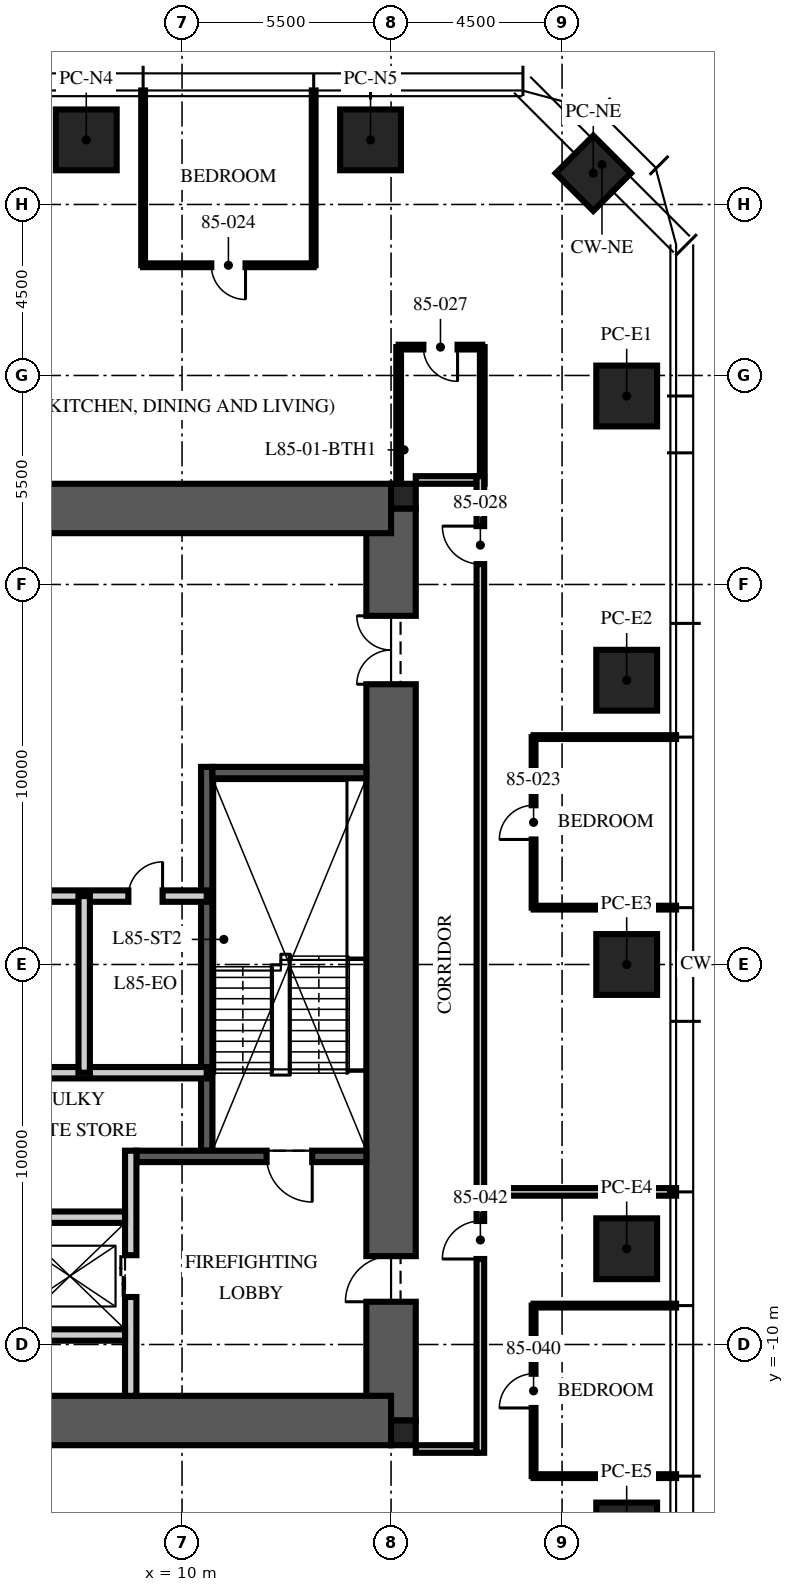
"""IFC4 building model, lengths in metres.
Left out: names, types, materials, properties, quantities, classifications, styles, units other than length and angle.
Written with IfcOpenShell. Run it as: python <this file> out.ifc"""

import sys

from ifc_helpers import new_model, si_unit, direction, frame, frame_2d, origin, origin_2d, place, context, subcontext, project, spatial, rectangle, extrude, element, fill, save


model = new_model("IFC4")
c1 = context("Model", 3, precision=1e-05, world=origin(), true_north=direction((0.0, 1.0)))
c2 = subcontext(c1, "Body", "Model", "MODEL_VIEW")
j1 = project(units=[si_unit("LENGTHUNIT", "METRE"), si_unit("PLANEANGLEUNIT", "RADIAN")], contexts=[c1])
p1 = place(None, origin())
s1 = spatial("IfcSite", under=j1, at=p1, CompositionType="ELEMENT")
p2 = place(p1, origin())
s2 = spatial("IfcBuilding", under=s1, at=p2, CompositionType="ELEMENT")
p3 = place(p2, frame((0.0, 0.0, 338.25)))
s3 = spatial("IfcBuildingStorey", under=s2, at=p3, CompositionType="ELEMENT", Elevation=338.25)
p4 = place(p3, frame((15.5, -12.0, -0.25), z_axis=(0.0, 0.0, 1.0), x_axis=(0.0, 1.0, 0.0)))
e1 = element("IfcWall", 1, at=p4, inside=s3, PredefinedType="SHEAR", context=c2, shape_type="SweptSolid", body=[
    extrude(rectangle(XDim=24.0, YDim=1.3, at=frame_2d((12.0, 0.0))), origin(), (0.0, 0.0, 1.0), 3.75),
])
p5 = place(p4, frame((3.125, 0.0, 0.25)))
e2 = element("IfcOpeningElement", 2, at=p5, cuts=e1, PredefinedType="OPENING", context=c2, shape_type="SweptSolid", body=[
    extrude(rectangle(XDim=1.2, YDim=2.1, at=frame_2d((0.6, 1.05))), frame((0.0, 0.66, 0.0), z_axis=(0.0, -1.0, 0.0), x_axis=(1.0, 0.0, 0.0)), (0.0, 0.0, 1.0), 1.32),
])
p6 = place(p4, frame((19.375, 0.0, 0.25)))
e3 = element("IfcOpeningElement", 3, at=p6, cuts=e1, PredefinedType="OPENING", context=c2, shape_type="SweptSolid", body=[
    extrude(rectangle(XDim=1.8, YDim=2.1, at=frame_2d((0.9, 1.05))), frame((0.0, 0.66, 0.0), z_axis=(0.0, -1.0, 0.0), x_axis=(1.0, 0.0, 0.0)), (0.0, 0.0, 1.0), 1.32),
])
for number, where, z_axis, x_axis in (
    (4, (-15.5, 12.0, -0.25), (0.0, 0.0, 1.0), (1.0, 0.0, 0.0)),
    (5, (-15.5, -12.0, -0.25), (0.0, 0.0, 1.0), (1.0, 0.0, 0.0)),
):
    element("IfcWall", number, at=place(p3, frame(where, z_axis=z_axis, x_axis=x_axis)), inside=s3, PredefinedType="SHEAR", context=c2, shape_type="SweptSolid", body=[
        extrude(rectangle(XDim=31.0, YDim=1.3, at=frame_2d((15.5, 0.0))), origin(), (0.0, 0.0, 1.0), 3.75),
    ])
for number, where, z_axis, x_axis in (
    (6, (15.825, 12.325, -0.25), (0.0, 0.0, 1.0), (1.0, 0.0, 0.0)),
    (7, (15.825, -12.325, -0.25), (0.0, 0.0, 1.0), (1.0, 0.0, 0.0)),
):
    element("IfcColumn", number, at=place(p3, frame(where, z_axis=z_axis, x_axis=x_axis)), inside=s3, PredefinedType="COLUMN", context=c2, shape_type="SweptSolid", body=[
        extrude(rectangle(XDim=0.65, YDim=0.65, at=origin_2d()), origin(), (0.0, 0.0, 1.0), 3.75),
    ])
for number, where, z_axis, x_axis in (
    (8, (7.48, 21.7, 0.0), (0.0, 0.0, 1.0), (1.0, 0.0, 0.0)),
    (9, (14.96, 21.7, 0.0), (0.0, 0.0, 1.0), (1.0, 0.0, 0.0)),
    (10, (21.7, 14.96, 0.0), (0.0, 0.0, 1.0), (0.0, 1.0, 0.0)),
    (11, (21.7, 7.48, 0.0), (0.0, 0.0, 1.0), (0.0, 1.0, 0.0)),
    (12, (21.7, 0.0, 0.0), (0.0, 0.0, 1.0), (0.0, 1.0, 0.0)),
    (13, (21.7, -7.48, 0.0), (0.0, 0.0, 1.0), (0.0, 1.0, 0.0)),
    (14, (21.7, -14.96, 0.0), (0.0, 0.0, 1.0), (0.0, 1.0, 0.0)),
):
    element("IfcColumn", number, at=place(p3, frame(where, z_axis=z_axis, x_axis=x_axis)), inside=s3, PredefinedType="COLUMN", context=c2, shape_type="SweptSolid", body=[
        extrude(rectangle(XDim=1.6, YDim=1.6, at=origin_2d()), origin(), (0.0, 0.0, 1.0), 3.75),
    ])
p7 = place(p3, frame((20.821, 20.821, 0.0), z_axis=(0.0, 0.0, 1.0), x_axis=(0.707106781187, -0.707106781187, 0.0)))
e15 = element("IfcColumn", 15, at=p7, inside=s3, PredefinedType="COLUMN", context=c2, shape_type="SweptSolid", body=[
    extrude(rectangle(XDim=1.4, YDim=1.4, at=origin_2d()), origin(), (0.0, 0.0, 1.0), 3.75),
])
p8 = place(p3, frame((10.65, -4.9, 0.0), z_axis=(0.0, 0.0, 1.0), x_axis=(0.0, 1.0, 0.0)))
e16 = element("IfcWall", 16, at=p8, inside=s3, PredefinedType="SOLIDWALL", context=c2, shape_type="SweptSolid", body=[
    extrude(rectangle(XDim=10.1, YDim=0.3, at=frame_2d((5.05, 0.0))), origin(), (0.0, 0.0, 1.0), 3.5),
])
p9 = place(p3, frame((14.85, -5.05, 0.0), z_axis=(0.0, 0.0, 1.0), x_axis=(-1.0, 0.0, 0.0)))
e17 = element("IfcWall", 17, at=p9, inside=s3, PredefinedType="SOLIDWALL", context=c2, shape_type="SweptSolid", body=[
    extrude(rectangle(XDim=6.05, YDim=0.3, at=frame_2d((3.025, 0.0))), origin(), (0.0, 0.0, 1.0), 3.5),
])
p10 = place(p9, frame((1.425, 0.0, 0.0)))
e18 = element("IfcOpeningElement", 18, at=p10, cuts=e17, PredefinedType="OPENING", context=c2, shape_type="SweptSolid", body=[
    extrude(rectangle(XDim=1.2, YDim=2.1, at=frame_2d((0.6, 1.05))), frame((0.0, 0.16, 0.0), z_axis=(0.0, -1.0, 0.0), x_axis=(1.0, 0.0, 0.0)), (0.0, 0.0, 1.0), 0.32),
])
p11 = place(p3, frame((14.85, 5.05, 0.0), z_axis=(0.0, 0.0, 1.0), x_axis=(-1.0, 0.0, 0.0)))
e19 = element("IfcWall", 19, at=p11, inside=s3, PredefinedType="SOLIDWALL", context=c2, shape_type="SweptSolid", body=[
    extrude(rectangle(XDim=4.05, YDim=0.3, at=frame_2d((2.025, 0.0))), origin(), (0.0, 0.0, 1.0), 3.5),
])
p12 = place(p3, frame((8.65, -11.35, 0.0), z_axis=(0.0, 0.0, 1.0), x_axis=(0.0, 1.0, 0.0)))
e20 = element("IfcWall", 20, at=p12, inside=s3, PredefinedType="PARTITIONING", context=c2, shape_type="SweptSolid", body=[
    extrude(rectangle(XDim=6.45, YDim=0.3, at=frame_2d((3.225, 0.0))), origin(), (0.0, 0.0, 1.0), 3.5),
])
p13 = place(p12, frame((2.6, 0.0, 0.0)))
e21 = element("IfcOpeningElement", 21, at=p13, cuts=e20, PredefinedType="OPENING", context=c2, shape_type="SweptSolid", body=[
    extrude(rectangle(XDim=1.1, YDim=2.1, at=frame_2d((0.55, 1.05))), frame((0.0, 0.16, 0.0), z_axis=(0.0, -1.0, 0.0), x_axis=(1.0, 0.0, 0.0)), (0.0, 0.0, 1.0), 0.32),
])
p14 = place(p3, frame((-8.5, -6.65, 0.0), z_axis=(0.0, 0.0, 1.0), x_axis=(1.0, 0.0, 0.0)))
e22 = element("IfcWall", 22, at=p14, inside=s3, PredefinedType="PARTITIONING", context=c2, shape_type="SweptSolid", body=[
    extrude(rectangle(XDim=17.0, YDim=0.3, at=frame_2d((8.5, 0.0))), origin(), (0.0, 0.0, 1.0), 3.5),
])
p15 = place(p14, frame((7.8, 0.0, 0.0)))
e23 = element("IfcOpeningElement", 23, at=p15, cuts=e22, PredefinedType="OPENING", context=c2, shape_type="SweptSolid", body=[
    extrude(rectangle(XDim=1.3, YDim=2.4, at=frame_2d((0.65, 1.2))), frame((0.0, 0.16, 0.0), z_axis=(0.0, -1.0, 0.0), x_axis=(1.0, 0.0, 0.0)), (0.0, 0.0, 1.0), 0.32),
])
p16 = place(p14, frame((5.65, 0.0, 0.0)))
e24 = element("IfcOpeningElement", 24, at=p16, cuts=e22, PredefinedType="OPENING", context=c2, shape_type="SweptSolid", body=[
    extrude(rectangle(XDim=0.9, YDim=2.1, at=frame_2d((0.45, 1.05))), frame((0.0, 0.16, 0.0), z_axis=(0.0, -1.0, 0.0), x_axis=(1.0, 0.0, 0.0)), (0.0, 0.0, 1.0), 0.32),
])
p17 = place(p14, frame((10.4, 0.0, 0.0)))
e25 = element("IfcOpeningElement", 25, at=p17, cuts=e22, PredefinedType="OPENING", context=c2, shape_type="SweptSolid", body=[
    extrude(rectangle(XDim=0.9, YDim=2.1, at=frame_2d((0.45, 1.05))), frame((0.0, 0.16, 0.0), z_axis=(0.0, -1.0, 0.0), x_axis=(1.0, 0.0, 0.0)), (0.0, 0.0, 1.0), 0.32),
])
p18 = place(p3, frame((5.6, -9.75, 0.0), z_axis=(0.0, 0.0, 1.0), x_axis=(1.0, 0.0, 0.0)))
e26 = element("IfcWall", 26, at=p18, inside=s3, PredefinedType="PARTITIONING", context=c2, shape_type="SweptSolid", body=[
    extrude(rectangle(XDim=2.9, YDim=0.3, at=frame_2d((1.45, 0.0))), origin(), (0.0, 0.0, 1.0), 3.5),
])
p19 = place(p3, frame((-10.65, 1.8, 0.0), z_axis=(0.0, 0.0, 1.0), x_axis=(1.0, 0.0, 0.0)))
e27 = element("IfcWall", 27, at=p19, inside=s3, PredefinedType="PARTITIONING", context=c2, shape_type="SweptSolid", body=[
    extrude(rectangle(XDim=21.3, YDim=0.3, at=frame_2d((10.65, 0.0))), origin(), (0.0, 0.0, 1.0), 3.5),
])
p20 = place(p19, frame((10.05, 0.0, 0.0)))
e28 = element("IfcOpeningElement", 28, at=p20, cuts=e27, PredefinedType="OPENING", context=c2, shape_type="SweptSolid", body=[
    extrude(rectangle(XDim=1.2, YDim=2.1, at=frame_2d((0.6, 1.05))), frame((0.0, 0.16, 0.0), z_axis=(0.0, -1.0, 0.0), x_axis=(1.0, 0.0, 0.0)), (0.0, 0.0, 1.0), 0.32),
])
p21 = place(p19, frame((19.238, 0.0, 0.0)))
e29 = element("IfcOpeningElement", 29, at=p21, cuts=e27, PredefinedType="OPENING", context=c2, shape_type="SweptSolid", body=[
    extrude(rectangle(XDim=0.9, YDim=2.1, at=frame_2d((0.45, 1.05))), frame((0.0, 0.16, 0.0), z_axis=(0.0, -1.0, 0.0), x_axis=(1.0, 0.0, 0.0)), (0.0, 0.0, 1.0), 0.32),
])
p22 = place(p3, frame((10.65, -2.848, 0.0), z_axis=(0.0, 0.0, 1.0), x_axis=(-1.0, 0.0, 0.0)))
e30 = element("IfcWall", 30, at=p22, inside=s3, PredefinedType="PARTITIONING", context=c2, shape_type="SweptSolid", body=[
    extrude(rectangle(XDim=6.45, YDim=0.3, at=frame_2d((3.225, 0.0))), origin(), (0.0, 0.0, 1.0), 3.5),
])
p23 = place(p3, frame((7.425, -2.848, 0.0), z_axis=(0.0, 0.0, 1.0), x_axis=(0.0, 1.0, 0.0)))
e31 = element("IfcWall", 31, at=p23, inside=s3, PredefinedType="PARTITIONING", context=c2, shape_type="SweptSolid", body=[
    extrude(rectangle(XDim=4.648, YDim=0.3, at=frame_2d((2.324, 0.0))), origin(), (0.0, 0.0, 1.0), 3.5),
])
for number, where, z_axis, x_axis in (
    (32, (16.15, 12.75, 0.0), (0.0, 0.0, 1.0), (1.0, 0.0, 0.0)),
    (33, (16.15, -12.75, 0.0), (0.0, 0.0, 1.0), (1.0, 0.0, 0.0)),
):
    element("IfcWall", number, at=place(p3, frame(where, z_axis=z_axis, x_axis=x_axis)), inside=s3, PredefinedType="PARTITIONING", context=c2, shape_type="SweptSolid", body=[
        extrude(rectangle(XDim=1.6, YDim=0.2, at=frame_2d((0.8, 0.0))), origin(), (0.0, 0.0, 1.0), 2.6),
    ])
p24 = place(p3, frame((17.95, -5.984, 0.0), z_axis=(0.0, 0.0, 1.0), x_axis=(1.0, 0.0, 0.0)))
e34 = element("IfcWall", 34, at=p24, inside=s3, PredefinedType="PARTITIONING", context=c2, shape_type="SweptSolid", body=[
    extrude(rectangle(XDim=5.05, YDim=0.2, at=frame_2d((2.525, 0.0))), origin(), (0.0, 0.0, 1.0), 3.01),
])
for number, where, z_axis, x_axis in (
    (35, (19.25, 1.496, 0.0), (0.0, 0.0, 1.0), (1.0, 0.0, 0.0)),
    (36, (19.25, 5.984, 0.0), (0.0, 0.0, 1.0), (1.0, 0.0, 0.0)),
):
    element("IfcWall", number, at=place(p3, frame(where, z_axis=z_axis, x_axis=x_axis)), inside=s3, PredefinedType="PARTITIONING", context=c2, shape_type="SweptSolid", body=[
        extrude(rectangle(XDim=3.75, YDim=0.1, at=frame_2d((1.875, 0.0))), origin(), (0.0, 0.0, 1.0), 3.01),
    ])
for number, where, z_axis, x_axis in (
    (37, (13.464, 18.4, 0.0), (0.0, 0.0, 1.0), (0.0, 1.0, 0.0)),
    (38, (8.976, 18.4, 0.0), (0.0, 0.0, 1.0), (0.0, 1.0, 0.0)),
):
    element("IfcWall", number, at=place(p3, frame(where, z_axis=z_axis, x_axis=x_axis)), inside=s3, PredefinedType="PARTITIONING", context=c2, shape_type="SweptSolid", body=[
        extrude(rectangle(XDim=4.6, YDim=0.1, at=frame_2d((2.3, 0.0))), origin(), (0.0, 0.0, 1.0), 3.01),
    ])
for number, where, z_axis, x_axis in (
    (39, (19.25, -13.464, 0.0), (0.0, 0.0, 1.0), (1.0, 0.0, 0.0)),
    (40, (19.25, -8.976, 0.0), (0.0, 0.0, 1.0), (1.0, 0.0, 0.0)),
):
    element("IfcWall", number, at=place(p3, frame(where, z_axis=z_axis, x_axis=x_axis)), inside=s3, PredefinedType="PARTITIONING", context=c2, shape_type="SweptSolid", body=[
        extrude(rectangle(XDim=3.75, YDim=0.1, at=frame_2d((1.875, 0.0))), origin(), (0.0, 0.0, 1.0), 3.01),
    ])
p25 = place(p3, frame((19.25, 1.496, 0.0), z_axis=(0.0, 0.0, 1.0), x_axis=(0.0, 1.0, 0.0)))
e41 = element("IfcWall", 41, at=p25, inside=s3, PredefinedType="PARTITIONING", context=c2, shape_type="SweptSolid", body=[
    extrude(rectangle(XDim=4.488, YDim=0.1, at=frame_2d((2.244, 0.0))), origin(), (0.0, 0.0, 1.0), 2.91),
])
p26 = place(p25, frame((1.794, 0.0, 0.0)))
e42 = element("IfcOpeningElement", 42, at=p26, cuts=e41, PredefinedType="OPENING", context=c2, shape_type="SweptSolid", body=[
    extrude(rectangle(XDim=0.9, YDim=2.1, at=frame_2d((0.45, 1.05))), frame((0.0, 0.06, 0.0), z_axis=(0.0, -1.0, 0.0), x_axis=(1.0, 0.0, 0.0)), (0.0, 0.0, 1.0), 0.12),
])
p27 = place(p3, frame((13.464, 18.4, 0.0), z_axis=(0.0, 0.0, 1.0), x_axis=(-1.0, 0.0, 0.0)))
e43 = element("IfcWall", 43, at=p27, inside=s3, PredefinedType="PARTITIONING", context=c2, shape_type="SweptSolid", body=[
    extrude(rectangle(XDim=4.488, YDim=0.1, at=frame_2d((2.244, 0.0))), origin(), (0.0, 0.0, 1.0), 2.91),
])
p28 = place(p27, frame((1.794, 0.0, 0.0)))
e44 = element("IfcOpeningElement", 44, at=p28, cuts=e43, PredefinedType="OPENING", context=c2, shape_type="SweptSolid", body=[
    extrude(rectangle(XDim=0.9, YDim=2.1, at=frame_2d((0.45, 1.05))), frame((0.0, 0.06, 0.0), z_axis=(0.0, -1.0, 0.0), x_axis=(1.0, 0.0, 0.0)), (0.0, 0.0, 1.0), 0.12),
])
p29 = place(p3, frame((17.9, 16.246, 0.0), z_axis=(0.0, 0.0, 1.0), x_axis=(-1.0, 0.0, 0.0)))
e45 = element("IfcWall", 45, at=p29, inside=s3, PredefinedType="PARTITIONING", context=c2, shape_type="SweptSolid", body=[
    extrude(rectangle(XDim=2.2, YDim=0.125, at=frame_2d((1.1, 0.0))), origin(), (0.0, 0.0, 1.0), 2.6),
])
p30 = place(p29, frame((0.65, 0.0, 0.0)))
e46 = element("IfcOpeningElement", 46, at=p30, cuts=e45, PredefinedType="OPENING", context=c2, shape_type="SweptSolid", body=[
    extrude(rectangle(XDim=0.9, YDim=2.1, at=frame_2d((0.45, 1.05))), frame((0.0, 0.073, 0.0), z_axis=(0.0, -1.0, 0.0), x_axis=(1.0, 0.0, 0.0)), (0.0, 0.0, 1.0), 0.145),
])
for number, where, z_axis, x_axis in (
    (47, (17.9, 12.65, 0.0), (0.0, 0.0, 1.0), (0.0, 1.0, 0.0)),
    (48, (15.7, 12.65, 0.0), (0.0, 0.0, 1.0), (0.0, 1.0, 0.0)),
):
    element("IfcWall", number, at=place(p3, frame(where, z_axis=z_axis, x_axis=x_axis)), inside=s3, PredefinedType="PARTITIONING", context=c2, shape_type="SweptSolid", body=[
        extrude(rectangle(XDim=3.596, YDim=0.125, at=frame_2d((1.798, 0.0))), origin(), (0.0, 0.0, 1.0), 2.6),
    ])
p31 = place(p3, frame((19.25, -13.464, 0.0), z_axis=(0.0, 0.0, 1.0), x_axis=(0.0, 1.0, 0.0)))
e49 = element("IfcWall", 49, at=p31, inside=s3, PredefinedType="PARTITIONING", context=c2, shape_type="SweptSolid", body=[
    extrude(rectangle(XDim=4.488, YDim=0.1, at=frame_2d((2.244, 0.0))), origin(), (0.0, 0.0, 1.0), 2.91),
])
p32 = place(p31, frame((1.794, 0.0, 0.0)))
e50 = element("IfcOpeningElement", 50, at=p32, cuts=e49, PredefinedType="OPENING", context=c2, shape_type="SweptSolid", body=[
    extrude(rectangle(XDim=0.9, YDim=2.1, at=frame_2d((0.45, 1.05))), frame((0.0, 0.06, 0.0), z_axis=(0.0, -1.0, 0.0), x_axis=(1.0, 0.0, 0.0)), (0.0, 0.0, 1.0), 0.12),
])
p33 = place(p3, frame((17.85, -12.85, 0.0), z_axis=(0.0, 0.0, 1.0), x_axis=(0.0, 1.0, 0.0)))
e51 = element("IfcWall", 51, at=p33, inside=s3, PredefinedType="PARTITIONING", context=c2, shape_type="SweptSolid", body=[
    extrude(rectangle(XDim=25.7, YDim=0.2, at=frame_2d((12.85, 0.0))), origin(), (0.0, 0.0, 1.0), 2.9),
])
p34 = place(p33, frame((23.386, 0.0, 0.0)))
e52 = element("IfcOpeningElement", 52, at=p34, cuts=e51, PredefinedType="OPENING", context=c2, shape_type="SweptSolid", body=[
    extrude(rectangle(XDim=1.0, YDim=2.2, at=frame_2d((0.5, 1.1))), frame((0.0, 0.11, 0.0), z_axis=(0.0, -1.0, 0.0), x_axis=(1.0, 0.0, 0.0)), (0.0, 0.0, 1.0), 0.22),
])
p35 = place(p33, frame((5.1, 0.0, 0.0)))
e53 = element("IfcOpeningElement", 53, at=p35, cuts=e51, PredefinedType="OPENING", context=c2, shape_type="SweptSolid", body=[
    extrude(rectangle(XDim=1.0, YDim=2.2, at=frame_2d((0.5, 1.1))), frame((0.0, 0.11, 0.0), z_axis=(0.0, -1.0, 0.0), x_axis=(1.0, 0.0, 0.0)), (0.0, 0.0, 1.0), 0.22),
])
p36 = place(p10, origin())
e54 = element("IfcDoor", 54, at=p36, inside=s3, OperationType="SINGLE_SWING_LEFT", PredefinedType="DOOR", context=c2, shape_type="SweptSolid", body=[
    extrude(rectangle(XDim=1.2, YDim=2.1, at=frame_2d((0.6, 1.05))), frame((0.0, 0.025, 0.0), z_axis=(0.0, -1.0, 0.0), x_axis=(1.0, 0.0, 0.0)), (0.0, 0.0, 1.0), 0.05),
])
fill(e18, e54)
p37 = place(p5, origin())
e55 = element("IfcDoor", 55, at=p37, inside=s3, OperationType="SINGLE_SWING_LEFT", PredefinedType="DOOR", context=c2, shape_type="SweptSolid", body=[
    extrude(rectangle(XDim=1.2, YDim=2.1, at=frame_2d((0.6, 1.05))), frame((0.0, 0.025, 0.0), z_axis=(0.0, -1.0, 0.0), x_axis=(1.0, 0.0, 0.0)), (0.0, 0.0, 1.0), 0.05),
])
fill(e2, e55)
p38 = place(p6, origin())
e56 = element("IfcDoor", 56, at=p38, inside=s3, OperationType="DOUBLE_DOOR_SINGLE_SWING", PredefinedType="DOOR", context=c2, shape_type="SweptSolid", body=[
    extrude(rectangle(XDim=1.8, YDim=2.1, at=frame_2d((0.9, 1.05))), frame((0.0, 0.025, 0.0), z_axis=(0.0, -1.0, 0.0), x_axis=(1.0, 0.0, 0.0)), (0.0, 0.0, 1.0), 0.05),
])
fill(e3, e56)
p39 = place(p13, origin())
e57 = element("IfcDoor", 57, at=p39, inside=s3, OperationType="DOUBLE_DOOR_SLIDING", PredefinedType="DOOR", context=c2, shape_type="SweptSolid", body=[
    extrude(rectangle(XDim=1.1, YDim=2.1, at=frame_2d((0.55, 1.05))), frame((0.0, 0.025, 0.0), z_axis=(0.0, -1.0, 0.0), x_axis=(1.0, 0.0, 0.0)), (0.0, 0.0, 1.0), 0.05),
])
fill(e21, e57)
p40 = place(p21, origin())
e58 = element("IfcDoor", 58, at=p40, inside=s3, OperationType="SINGLE_SWING_RIGHT", PredefinedType="DOOR", context=c2, shape_type="SweptSolid", body=[
    extrude(rectangle(XDim=0.9, YDim=2.1, at=frame_2d((0.45, 1.05))), frame((0.0, 0.025, 0.0), z_axis=(0.0, -1.0, 0.0), x_axis=(1.0, 0.0, 0.0)), (0.0, 0.0, 1.0), 0.05),
])
fill(e29, e58)
p41 = place(p26, origin())
e59 = element("IfcDoor", 59, at=p41, inside=s3, OperationType="SINGLE_SWING_LEFT", PredefinedType="DOOR", context=c2, shape_type="SweptSolid", body=[
    extrude(rectangle(XDim=0.9, YDim=2.1, at=frame_2d((0.45, 1.05))), frame((0.0, 0.025, 0.0), z_axis=(0.0, -1.0, 0.0), x_axis=(1.0, 0.0, 0.0)), (0.0, 0.0, 1.0), 0.05),
])
fill(e42, e59)
p42 = place(p28, origin())
e60 = element("IfcDoor", 60, at=p42, inside=s3, OperationType="SINGLE_SWING_LEFT", PredefinedType="DOOR", context=c2, shape_type="SweptSolid", body=[
    extrude(rectangle(XDim=0.9, YDim=2.1, at=frame_2d((0.45, 1.05))), frame((0.0, 0.025, 0.0), z_axis=(0.0, -1.0, 0.0), x_axis=(1.0, 0.0, 0.0)), (0.0, 0.0, 1.0), 0.05),
])
fill(e44, e60)
p43 = place(p30, origin())
e61 = element("IfcDoor", 61, at=p43, inside=s3, OperationType="SINGLE_SWING_LEFT", PredefinedType="DOOR", context=c2, shape_type="SweptSolid", body=[
    extrude(rectangle(XDim=0.9, YDim=2.1, at=frame_2d((0.45, 1.05))), frame((0.0, 0.025, 0.0), z_axis=(0.0, -1.0, 0.0), x_axis=(1.0, 0.0, 0.0)), (0.0, 0.0, 1.0), 0.05),
])
fill(e46, e61)
p44 = place(p34, origin())
e62 = element("IfcDoor", 62, at=p44, inside=s3, OperationType="SINGLE_SWING_RIGHT", PredefinedType="DOOR", context=c2, shape_type="SweptSolid", body=[
    extrude(rectangle(XDim=1.0, YDim=2.2, at=frame_2d((0.5, 1.1))), frame((0.0, 0.025, 0.0), z_axis=(0.0, -1.0, 0.0), x_axis=(1.0, 0.0, 0.0)), (0.0, 0.0, 1.0), 0.05),
])
fill(e52, e62)
p45 = place(p32, origin())
e63 = element("IfcDoor", 63, at=p45, inside=s3, OperationType="SINGLE_SWING_LEFT", PredefinedType="DOOR", context=c2, shape_type="SweptSolid", body=[
    extrude(rectangle(XDim=0.9, YDim=2.1, at=frame_2d((0.45, 1.05))), frame((0.0, 0.025, 0.0), z_axis=(0.0, -1.0, 0.0), x_axis=(1.0, 0.0, 0.0)), (0.0, 0.0, 1.0), 0.05),
])
fill(e50, e63)
p46 = place(p35, origin())
e64 = element("IfcDoor", 64, at=p46, inside=s3, OperationType="SINGLE_SWING_LEFT", PredefinedType="DOOR", context=c2, shape_type="SweptSolid", body=[
    extrude(rectangle(XDim=1.0, YDim=2.2, at=frame_2d((0.5, 1.1))), frame((0.0, 0.025, 0.0), z_axis=(0.0, -1.0, 0.0), x_axis=(1.0, 0.0, 0.0)), (0.0, 0.0, 1.0), 0.05),
])
fill(e53, e64)
save(model, sys.argv[1])
